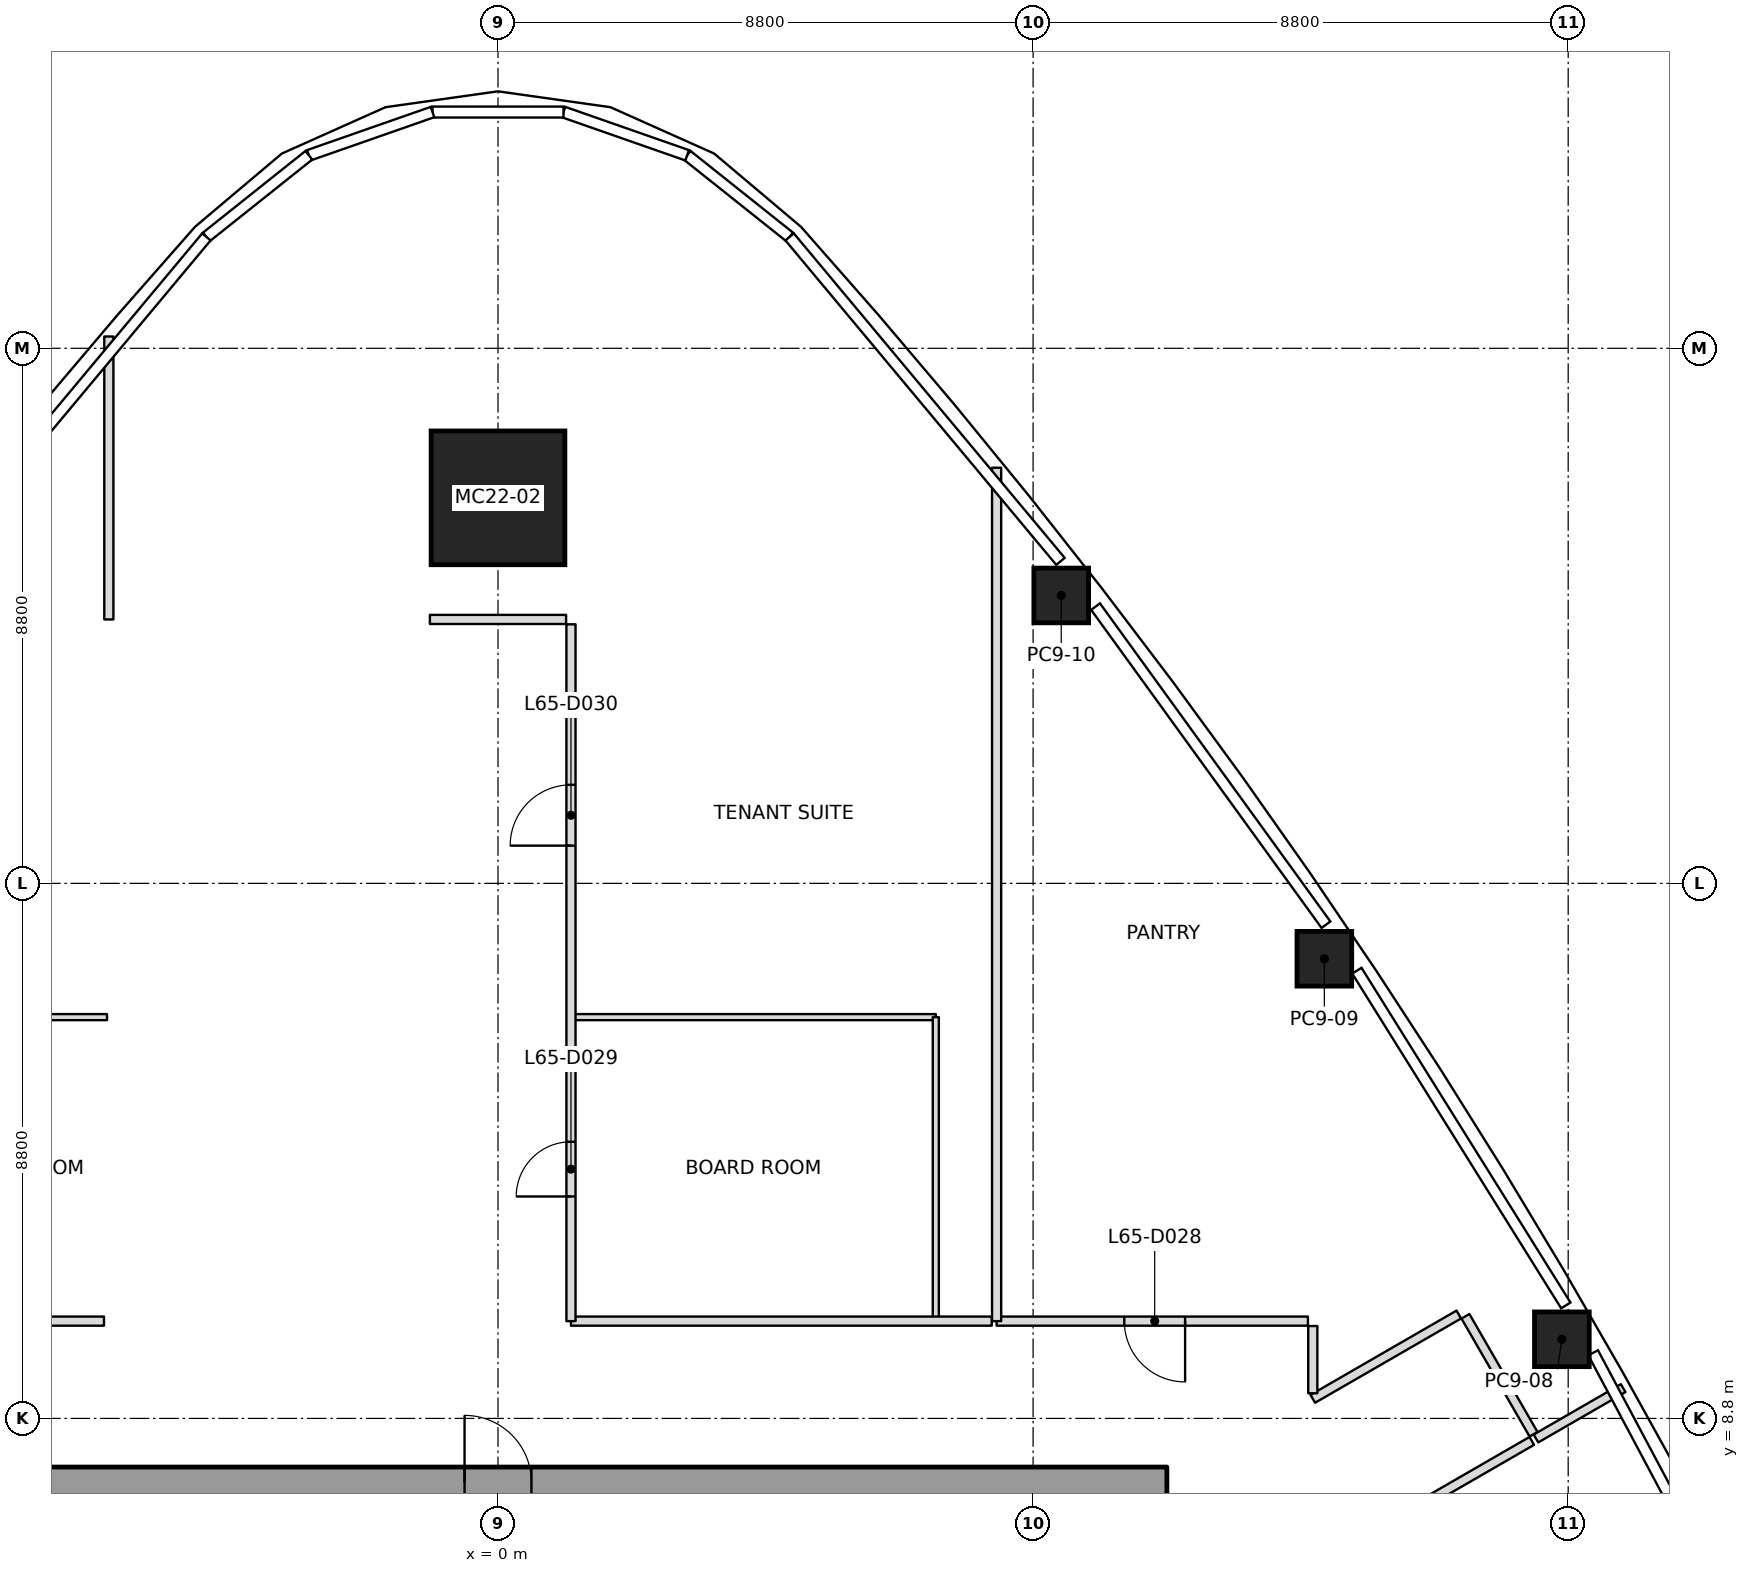
"""IFC4 building model, lengths in metres.
Left out: names, types, materials, properties, quantities, classifications, styles, units other than length and angle.
Written with IfcOpenShell. Run it as: python <this file> out.ifc"""

import sys

from ifc_helpers import new_model, si_unit, direction, frame, frame_2d, origin, origin_2d, place, context, subcontext, project, spatial, rectangle, extrude, element, fill, save


model = new_model("IFC4")
c1 = context("Model", 3, precision=1e-05, world=origin(), true_north=direction((0.0, 1.0)))
c2 = subcontext(c1, "Body", "Model", "MODEL_VIEW")
j1 = project(units=[si_unit("LENGTHUNIT", "METRE"), si_unit("PLANEANGLEUNIT", "RADIAN")], contexts=[c1])
p1 = place(None, origin())
s1 = spatial("IfcSite", under=j1, at=p1, CompositionType="ELEMENT")
p2 = place(p1, origin())
s2 = spatial("IfcBuilding", under=s1, at=p2, CompositionType="ELEMENT")
p3 = place(p2, frame((0.0, 0.0, 287.0)))
s3 = spatial("IfcBuildingStorey", under=s2, at=p3, CompositionType="ELEMENT", Elevation=287.0)
p4 = place(p3, frame((0.0, 23.941, 0.0), z_axis=(0.0, -0.032027018848, 0.999487003449), x_axis=(1.0, 0.0, 0.0)))
e1 = element("IfcColumn", 1, at=p4, inside=s3, PredefinedType="COLUMN", context=c2, shape_type="SweptSolid", body=[
    extrude(rectangle(XDim=2.2, YDim=2.2, at=origin_2d()), origin(), (0.0, 0.0, 1.0), 4.002),
])
p5 = place(p3, frame((17.496, 10.101, 0.0), z_axis=(-0.009887052741, -0.005675900648, 0.999935013058), x_axis=(-0.49997556095, 0.866039512773, -2.7732311e-05)))
e2 = element("IfcColumn", 2, at=p5, inside=s3, PredefinedType="COLUMN", context=c2, shape_type="SweptSolid", body=[
    extrude(rectangle(XDim=0.9, YDim=0.9, at=origin_2d()), origin(), (0.0, 0.0, 1.0), 4.0),
])
p6 = place(p3, frame((13.59, 16.36, 0.0), z_axis=(-0.00530952661, -0.013121243922, 0.999899815924), x_axis=(-0.558332488249, 0.829579461873, 0.007921426869)))
e3 = element("IfcColumn", 3, at=p6, inside=s3, PredefinedType="COLUMN", context=c2, shape_type="SweptSolid", body=[
    extrude(rectangle(XDim=0.9, YDim=0.9, at=origin_2d()), origin(), (0.0, 0.0, 1.0), 4.0),
])
p7 = place(p3, frame((9.263, 22.335, 0.0), z_axis=(-0.000244090207, -0.020320509722, 0.999793487329), x_axis=(-0.614040008513, 0.789114959784, 0.01588861826)))
e4 = element("IfcColumn", 4, at=p7, inside=s3, PredefinedType="COLUMN", context=c2, shape_type="SweptSolid", body=[
    extrude(rectangle(XDim=0.9, YDim=0.9, at=origin_2d()), origin(), (0.0, 0.0, 1.0), 4.001),
])
p8 = place(p3, frame((-11.0, 7.75, 0.0), z_axis=(0.0, 0.0, 1.0), x_axis=(1.0, 0.0, 0.0)))
e5 = element("IfcWall", 5, at=p8, inside=s3, PredefinedType="SHEAR", context=c2, shape_type="SweptSolid", body=[
    extrude(rectangle(XDim=22.0, YDim=0.5, at=frame_2d((11.0, 0.0))), origin(), (0.0, 0.0, 1.0), 4.0),
])
p9 = place(p8, frame((10.45, 0.0, 0.0)))
e6 = element("IfcOpeningElement", 6, at=p9, cuts=e5, PredefinedType="OPENING", context=c2, shape_type="SweptSolid", body=[
    extrude(rectangle(XDim=1.1, YDim=2.1, at=frame_2d((0.55, 1.05))), frame((0.0, 0.25, 0.0), z_axis=(0.0, -1.0, 0.0), x_axis=(1.0, 0.0, 0.0)), (0.0, 0.0, 1.0), 0.5),
])
p10 = place(p3, frame((-6.4, 21.941, 0.0), z_axis=(0.0, 0.0, 1.0), x_axis=(0.0, 1.0, 0.0)))
e7 = element("IfcWall", 7, at=p10, inside=s3, PredefinedType="PARTITIONING", context=c2, shape_type="SweptSolid", body=[
    extrude(rectangle(XDim=4.653, YDim=0.15, at=frame_2d((2.327, 0.0))), origin(), (0.0, 0.0, 1.0), 3.234),
])
p11 = place(p3, frame((8.2, 10.4, 0.0), z_axis=(0.0, 0.0, 1.0), x_axis=(0.0, 1.0, 0.0)))
e8 = element("IfcWall", 8, at=p11, inside=s3, PredefinedType="PARTITIONING", context=c2, shape_type="SweptSolid", body=[
    extrude(rectangle(XDim=14.036, YDim=0.15, at=frame_2d((7.018, 0.0))), origin(), (0.0, 0.0, 1.0), 3.084),
])
p12 = place(p3, frame((17.071, 8.47, 0.0), z_axis=(0.0, 0.0, 1.0), x_axis=(0.866011236992, 0.500024536802, 0.0)))
e9 = element("IfcWall", 9, at=p12, inside=s3, PredefinedType="PARTITIONING", context=c2, shape_type="SweptSolid", body=[
    extrude(rectangle(XDim=1.656, YDim=0.15, at=frame_2d((0.828, 0.0))), origin(), (0.0, 0.0, 1.0), 3.084),
])
p13 = place(p3, frame((-6.48, 10.4, 0.0), z_axis=(0.0, 0.0, 1.0), x_axis=(-1.0, 0.0, 0.0)))
e10 = element("IfcWall", 10, at=p13, inside=s3, PredefinedType="PARTITIONING", context=c2, shape_type="SweptSolid", body=[
    extrude(rectangle(XDim=6.84, YDim=0.15, at=frame_2d((3.42, 0.0))), origin(), (0.0, 0.0, 1.0), 3.3),
])
p14 = place(p13, frame((1.57, 0.0, 0.0)))
e11 = element("IfcOpeningElement", 11, at=p14, cuts=e10, PredefinedType="OPENING", context=c2, shape_type="SweptSolid", body=[
    extrude(rectangle(XDim=0.9, YDim=2.1, at=frame_2d((0.45, 1.05))), frame((0.0, 0.075, 0.0), z_axis=(0.0, -1.0, 0.0), x_axis=(1.0, 0.0, 0.0)), (0.0, 0.0, 1.0), 0.15),
])
p15 = place(p13, frame((5.07, 0.0, 0.0)))
e12 = element("IfcOpeningElement", 12, at=p15, cuts=e10, PredefinedType="OPENING", context=c2, shape_type="SweptSolid", body=[
    extrude(rectangle(XDim=1.0, YDim=2.1, at=frame_2d((0.5, 1.05))), frame((0.0, 0.075, 0.0), z_axis=(0.0, -1.0, 0.0), x_axis=(1.0, 0.0, 0.0)), (0.0, 0.0, 1.0), 0.15),
])
p16 = place(p3, frame((1.12, 21.941, 0.0), z_axis=(0.0, 0.0, 1.0), x_axis=(-1.0, 0.0, 0.0)))
e13 = element("IfcWall", 13, at=p16, inside=s3, PredefinedType="PARTITIONING", context=c2, shape_type="SweptSolid", body=[
    extrude(rectangle(XDim=2.24, YDim=0.15, at=frame_2d((1.12, 0.0))), origin(), (0.0, 0.0, 1.0), 3.233),
])
p17 = place(p3, frame((8.12, 10.4, 0.0), z_axis=(0.0, 0.0, 1.0), x_axis=(-1.0, 0.0, 0.0)))
e14 = element("IfcWall", 14, at=p17, inside=s3, PredefinedType="PARTITIONING", context=c2, shape_type="SweptSolid", body=[
    extrude(rectangle(XDim=6.92, YDim=0.15, at=frame_2d((3.46, 0.0))), origin(), (0.0, 0.0, 1.0), 3.3),
])
p18 = place(p3, frame((1.2, 10.4, 0.0), z_axis=(0.0, 0.0, 1.0), x_axis=(0.0, 1.0, 0.0)))
e15 = element("IfcWall", 15, at=p18, inside=s3, PredefinedType="PARTITIONING", context=c2, shape_type="SweptSolid", body=[
    extrude(rectangle(XDim=11.461, YDim=0.15, at=frame_2d((5.73, 0.0))), origin(), (0.0, 0.0, 1.0), 3.097),
])
p19 = place(p18, frame((2.05, 0.0, 0.0)))
e16 = element("IfcOpeningElement", 16, at=p19, cuts=e15, PredefinedType="OPENING", context=c2, shape_type="SweptSolid", body=[
    extrude(rectangle(XDim=0.9, YDim=2.1, at=frame_2d((0.45, 1.05))), frame((0.0, 0.075, 0.0), z_axis=(0.0, -1.0, 0.0), x_axis=(1.0, 0.0, 0.0)), (0.0, 0.0, 1.0), 0.15),
])
p20 = place(p18, frame((7.82, 0.0, 0.0)))
e17 = element("IfcOpeningElement", 17, at=p20, cuts=e15, PredefinedType="OPENING", context=c2, shape_type="SweptSolid", body=[
    extrude(rectangle(XDim=1.0, YDim=2.1, at=frame_2d((0.5, 1.05))), frame((0.0, 0.075, 0.0), z_axis=(0.0, -1.0, 0.0), x_axis=(1.0, 0.0, 0.0)), (0.0, 0.0, 1.0), 0.15),
])
p21 = place(p3, frame((13.32, 10.4, 0.0), z_axis=(0.0, 0.0, 1.0), x_axis=(-1.0, 0.0, 0.0)))
e18 = element("IfcWall", 18, at=p21, inside=s3, PredefinedType="PARTITIONING", context=c2, shape_type="SweptSolid", body=[
    extrude(rectangle(XDim=5.12, YDim=0.15, at=frame_2d((2.56, 0.0))), origin(), (0.0, 0.0, 1.0), 3.293),
])
p22 = place(p21, frame((2.02, 0.0, 0.0)))
e19 = element("IfcOpeningElement", 19, at=p22, cuts=e18, PredefinedType="OPENING", context=c2, shape_type="SweptSolid", body=[
    extrude(rectangle(XDim=1.0, YDim=2.1, at=frame_2d((0.5, 1.05))), frame((0.0, 0.075, 0.0), z_axis=(0.0, -1.0, 0.0), x_axis=(1.0, 0.0, 0.0)), (0.0, 0.0, 1.0), 0.15),
])
p23 = place(p3, frame((13.4, 6.351, 0.0), z_axis=(0.0, 0.0, 1.0), x_axis=(0.866037957609, 0.499978255508, 0.0)))
e20 = element("IfcWall", 20, at=p23, inside=s3, PredefinedType="PARTITIONING", context=c2, shape_type="SweptSolid", body=[
    extrude(rectangle(XDim=4.158, YDim=0.15, at=frame_2d((2.079, 0.0))), origin(), (0.0, 0.0, 1.0), 3.3),
])
p24 = place(p3, frame((15.801, 10.509, 0.0), z_axis=(0.0, 0.0, 1.0), x_axis=(-0.86601843628, -0.500012067877, 0.0)))
e21 = element("IfcWall", 21, at=p24, inside=s3, PredefinedType="PARTITIONING", context=c2, shape_type="SweptSolid", body=[
    extrude(rectangle(XDim=2.773, YDim=0.15, at=frame_2d((1.386, 0.0))), origin(), (0.0, 0.0, 1.0), 3.3),
])
p25 = place(p3, frame((13.4, 9.214, 0.0), z_axis=(0.0, 0.0, 1.0), x_axis=(0.0, 1.0, 0.0)))
e22 = element("IfcWall", 22, at=p25, inside=s3, PredefinedType="PARTITIONING", context=c2, shape_type="SweptSolid", body=[
    extrude(rectangle(XDim=1.106, YDim=0.15, at=frame_2d((0.553, 0.0))), origin(), (0.0, 0.0, 1.0), 3.3),
])
p26 = place(p3, frame((17.031, 8.539, 0.0), z_axis=(0.0, 0.0, 1.0), x_axis=(-0.500030632641, 0.866007717299, 0.0)))
e23 = element("IfcWall", 23, at=p26, inside=s3, PredefinedType="PARTITIONING", context=c2, shape_type="SweptSolid", body=[
    extrude(rectangle(XDim=2.24, YDim=0.15, at=frame_2d((1.12, 0.0))), origin(), (0.0, 0.0, 1.0), 3.3),
])
p27 = place(p3, frame((-10.6, 15.4, 0.0), z_axis=(0.0, 0.0, 1.0), x_axis=(1.0, 0.0, 0.0)))
e24 = element("IfcWall", 24, at=p27, inside=s3, PredefinedType="PARTITIONING", context=c2, shape_type="SweptSolid", body=[
    extrude(rectangle(XDim=4.17, YDim=0.1, at=frame_2d((2.085, 0.0))), origin(), (0.0, 0.0, 1.0), 3.247),
])
p28 = place(p3, frame((1.23, 15.4, 0.0), z_axis=(0.0, 0.0, 1.0), x_axis=(1.0, 0.0, 0.0)))
e25 = element("IfcWall", 25, at=p28, inside=s3, PredefinedType="PARTITIONING", context=c2, shape_type="SweptSolid", body=[
    extrude(rectangle(XDim=5.97, YDim=0.1, at=frame_2d((2.985, 0.0))), origin(), (0.0, 0.0, 1.0), 3.243),
])
p29 = place(p3, frame((7.2, 15.4, 0.0), z_axis=(0.0, 0.0, 1.0), x_axis=(0.0, -1.0, 0.0)))
e26 = element("IfcWall", 26, at=p29, inside=s3, PredefinedType="PARTITIONING", context=c2, shape_type="SweptSolid", body=[
    extrude(rectangle(XDim=4.97, YDim=0.1, at=frame_2d((2.485, 0.0))), origin(), (0.0, 0.0, 1.0), 3.097),
])
p30 = place(p22, origin())
e27 = element("IfcDoor", 27, at=p30, inside=s3, OperationType="SINGLE_SWING_LEFT", PredefinedType="DOOR", context=c2, shape_type="SweptSolid", body=[
    extrude(rectangle(XDim=1.0, YDim=2.1, at=frame_2d((0.5, 1.05))), frame((0.0, 0.025, 0.0), z_axis=(0.0, -1.0, 0.0), x_axis=(1.0, 0.0, 0.0)), (0.0, 0.0, 1.0), 0.05),
])
fill(e19, e27)
p31 = place(p19, origin())
e28 = element("IfcDoor", 28, at=p31, inside=s3, OperationType="SINGLE_SWING_LEFT", PredefinedType="DOOR", context=c2, shape_type="SweptSolid", body=[
    extrude(rectangle(XDim=0.9, YDim=2.1, at=frame_2d((0.45, 1.05))), frame((0.0, 0.025, 0.0), z_axis=(0.0, -1.0, 0.0), x_axis=(1.0, 0.0, 0.0)), (0.0, 0.0, 1.0), 0.05),
])
fill(e16, e28)
p32 = place(p20, origin())
e29 = element("IfcDoor", 29, at=p32, inside=s3, OperationType="SINGLE_SWING_RIGHT", PredefinedType="DOOR", context=c2, shape_type="SweptSolid", body=[
    extrude(rectangle(XDim=1.0, YDim=2.1, at=frame_2d((0.5, 1.05))), frame((0.0, 0.025, 0.0), z_axis=(0.0, -1.0, 0.0), x_axis=(1.0, 0.0, 0.0)), (0.0, 0.0, 1.0), 0.05),
])
fill(e17, e29)
p33 = place(p9, origin())
e30 = element("IfcDoor", 30, at=p33, inside=s3, OperationType="SINGLE_SWING_RIGHT", PredefinedType="DOOR", context=c2, shape_type="SweptSolid", body=[
    extrude(rectangle(XDim=1.1, YDim=2.1, at=frame_2d((0.55, 1.05))), frame((0.0, 0.025, 0.0), z_axis=(0.0, -1.0, 0.0), x_axis=(1.0, 0.0, 0.0)), (0.0, 0.0, 1.0), 0.05),
])
fill(e6, e30)
save(model, sys.argv[1])
